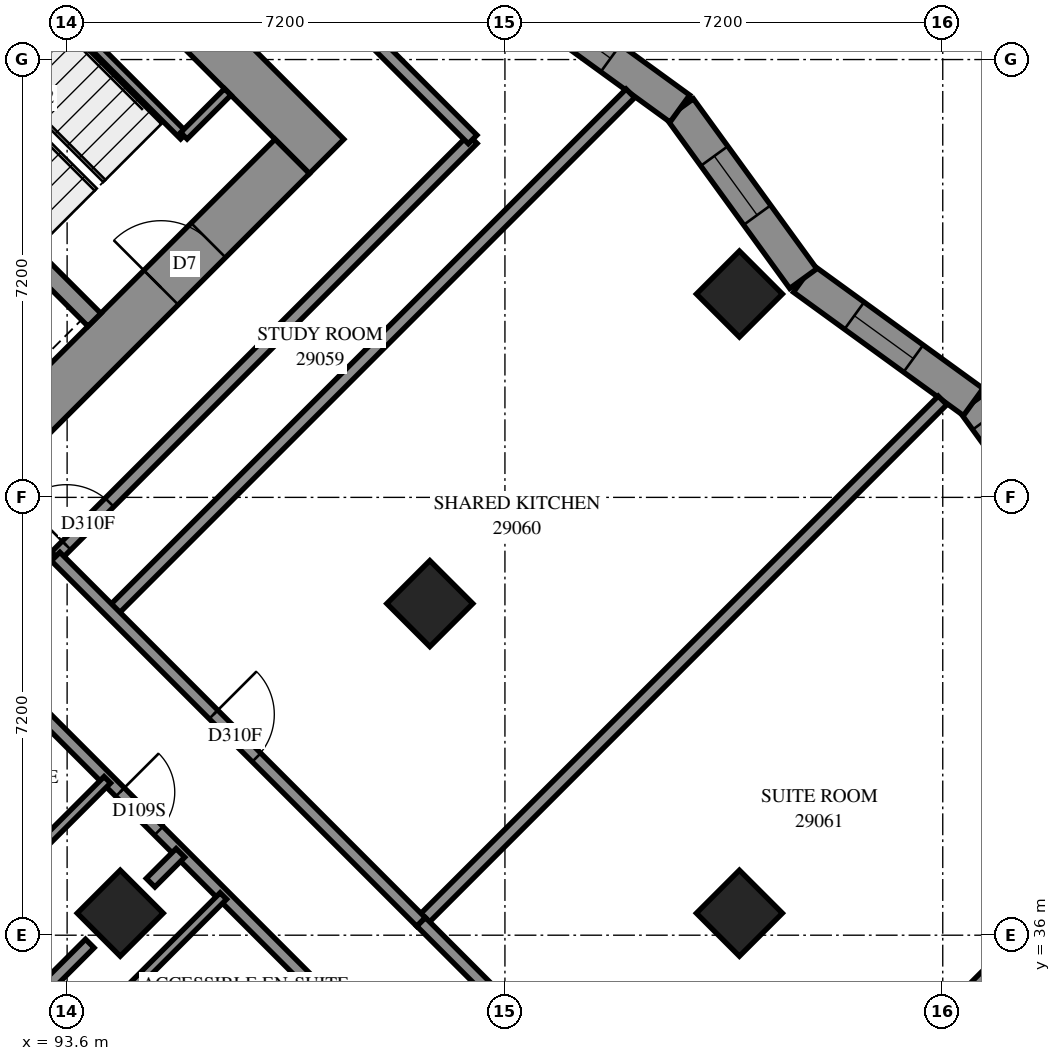
"""IFC4 building model, lengths in metres.
Left out: names, types, materials, properties, quantities, classifications, styles, units other than length and angle.
Written with IfcOpenShell. Run it as: python <this file> out.ifc"""

import sys

from ifc_helpers import new_model, si_unit, direction, frame, frame_2d, origin, origin_2d, place, context, subcontext, project, spatial, polyline, rectangle, outline, extrude, element, fill, save


model = new_model("IFC4")
c1 = context("Model", 3, precision=1e-05, world=origin(), true_north=direction((0.0, 1.0)))
c2 = subcontext(c1, "Body", "Model", "MODEL_VIEW")
j1 = project(units=[si_unit("LENGTHUNIT", "METRE"), si_unit("PLANEANGLEUNIT", "RADIAN")], contexts=[c1])
p1 = place(None, origin())
s1 = spatial("IfcSite", under=j1, at=p1, CompositionType="ELEMENT")
p2 = place(p1, origin())
s2 = spatial("IfcBuilding", under=s1, at=p2, CompositionType="ELEMENT")
p3 = place(p2, frame((0.0, 0.0, 108.4)))
s3 = spatial("IfcBuildingStorey", under=s2, at=p3, CompositionType="ELEMENT", Elevation=108.4)
for number, where, z_axis, x_axis in (
    (1, (104.656, 46.544, 0.0), (0.0, 0.0, 1.0), (0.707, -0.707, 0.0)),
    (2, (99.565, 41.453, 0.0), (0.0, 0.0, 1.0), (0.707, -0.707, 0.0)),
    (3, (94.474, 36.362, 0.0), (0.0, 0.0, 1.0), (0.707, -0.707, 0.0)),
    (4, (104.656, 36.362, 0.0), (0.0, 0.0, 1.0), (0.707, -0.707, 0.0)),
):
    element("IfcColumn", number, at=place(p3, frame(where, z_axis=z_axis, x_axis=x_axis)), inside=s3, PredefinedType="COLUMN", context=c2, shape_type="SweptSolid", body=[
        extrude(rectangle(XDim=1.0, YDim=1.0, at=origin_2d()), origin(), (0.0, 0.0, 1.0), 3.1),
    ])
p4 = place(p3, frame((86.554, 60.121, -0.3), z_axis=(0.0, 0.0, 1.0), x_axis=(0.7071067812, -0.7071067812, 0.0)))
e5 = element("IfcWall", 5, at=p4, inside=s3, PredefinedType="SHEAR", context=c2, shape_type="SweptSolid", body=[
    extrude(rectangle(XDim=16.0, YDim=0.8, at=frame_2d((8.0, 0.0))), origin(), (0.0, 0.0, 1.0), 2.7),
])
p5 = place(p4, frame((10.8, 0.0, 0.3)))
e6 = element("IfcOpeningElement", 6, at=p5, cuts=e5, PredefinedType="OPENING", context=c2, shape_type="SweptSolid", body=[
    extrude(rectangle(XDim=0.8, YDim=2.1, at=frame_2d((0.4, 1.05))), frame((0.0, 0.41, 0.0), z_axis=(0.0, -1.0, 0.0), x_axis=(1.0, 0.0, 0.0)), (0.0, 0.0, 1.0), 0.82),
])
p6 = place(p3, frame((87.12, 38.625, -0.3), z_axis=(0.0, 0.0, 1.0), x_axis=(0.7071067812, 0.7071067812, 0.0)))
e7 = element("IfcWall", 7, at=p6, inside=s3, PredefinedType="SHEAR", context=c2, shape_type="SweptSolid", body=[
    extrude(rectangle(XDim=14.4, YDim=0.8, at=frame_2d((7.2, 0.0))), origin(), (0.0, 0.0, 1.0), 2.7),
])
p7 = place(p6, frame((4.55, 0.0, 0.3)))
e8 = element("IfcOpeningElement", 8, at=p7, cuts=e7, PredefinedType="OPENING", context=c2, shape_type="SweptSolid", body=[
    extrude(rectangle(XDim=1.1, YDim=2.1, at=frame_2d((0.55, 1.05))), frame((0.0, 0.41, 0.0), z_axis=(0.0, -1.0, 0.0), x_axis=(1.0, 0.0, 0.0)), (0.0, 0.0, 1.0), 0.82),
])
p8 = place(p6, frame((11.35, 0.0, 0.3)))
e9 = element("IfcOpeningElement", 9, at=p8, cuts=e7, PredefinedType="OPENING", context=c2, shape_type="SweptSolid", body=[
    extrude(rectangle(XDim=1.1, YDim=2.1, at=frame_2d((0.55, 1.05))), frame((0.0, 0.41, 0.0), z_axis=(0.0, -1.0, 0.0), x_axis=(1.0, 0.0, 0.0)), (0.0, 0.0, 1.0), 0.82),
])
p9 = place(p3, frame((88.958, 51.211, 0.0), z_axis=(0.0, 0.0, 1.0), x_axis=(0.7070998367, -0.7071137256, 0.0)))
e10 = element("IfcWall", 10, at=p9, inside=s3, PredefinedType="SOLIDWALL", context=c2, shape_type="SweptSolid", body=[
    extrude(rectangle(XDim=7.2, YDim=0.3, at=frame_2d((3.6, 0.0))), origin(), (0.0, 0.0, 1.0), 3.1),
])
p10 = place(p3, frame((110.545, 41.953, 0.0), z_axis=(0.0, 0.0, 1.0), x_axis=(-0.5874159391, 0.8092851873, 0.0)))
e11 = element("IfcWall", 11, at=p10, inside=s3, PredefinedType="SOLIDWALL", context=c2, shape_type="SweptSolid", body=[
    extrude(outline(polyline([(0.067, -0.275), (3.522, -0.275), (3.435, 0.275), (-0.067, 0.275), (0.067, -0.275)])), origin(), (0.0, 0.0, 1.0), 3.1),
])
p11 = place(p10, frame((0.318, 0.0, 0.5)))
e12 = element("IfcOpeningElement", 12, at=p11, cuts=e11, PredefinedType="OPENING", context=c2, shape_type="SweptSolid", body=[
    extrude(rectangle(XDim=1.3, YDim=2.45, at=frame_2d((0.65, 1.225))), frame((0.0, 0.285, 0.0), z_axis=(0.0, -1.0, 0.0), x_axis=(1.0, 0.0, 0.0)), (0.0, 0.0, 1.0), 0.57),
])
p12 = place(p10, frame((1.817, 0.0, 0.5)))
e13 = element("IfcOpeningElement", 13, at=p12, cuts=e11, PredefinedType="OPENING", context=c2, shape_type="SweptSolid", body=[
    extrude(rectangle(XDim=1.3, YDim=2.45, at=frame_2d((0.65, 1.225))), frame((0.0, 0.285, 0.0), z_axis=(0.0, -1.0, 0.0), x_axis=(1.0, 0.0, 0.0)), (0.0, 0.0, 1.0), 0.57),
])
p13 = place(p3, frame((108.502, 44.768, 0.0), z_axis=(0.0, 0.0, 1.0), x_axis=(-0.8092802019, 0.5874228075, 0.0)))
e14 = element("IfcWall", 14, at=p13, inside=s3, PredefinedType="SOLIDWALL", context=c2, shape_type="SweptSolid", body=[
    extrude(outline(polyline([(-0.044, -0.275), (3.411, -0.275), (3.499, 0.275), (0.044, 0.275), (-0.044, -0.275)])), origin(), (0.0, 0.0, 1.0), 3.1),
])
p14 = place(p13, frame((1.218, 0.0, 0.5)))
e15 = element("IfcOpeningElement", 15, at=p14, cuts=e14, PredefinedType="OPENING", context=c2, shape_type="SweptSolid", body=[
    extrude(rectangle(XDim=1.2, YDim=2.45, at=frame_2d((0.6, 1.225))), frame((0.0, 0.285, 0.0), z_axis=(0.0, -1.0, 0.0), x_axis=(1.0, 0.0, 0.0)), (0.0, 0.0, 1.0), 0.57),
])
p15 = place(p3, frame((105.706, 46.797, 0.0), z_axis=(0.0, 0.0, 1.0), x_axis=(-0.5874228075, 0.8092802019, 0.0)))
e16 = element("IfcWall", 16, at=p15, inside=s3, PredefinedType="SOLIDWALL", context=c2, shape_type="SweptSolid", body=[
    extrude(outline(polyline([(0.044, -0.275), (3.499, -0.275), (3.411, 0.275), (-0.044, 0.275), (0.044, -0.275)])), origin(), (0.0, 0.0, 1.0), 3.1),
])
p16 = place(p15, frame((1.291, 0.0, 0.5)))
e17 = element("IfcOpeningElement", 17, at=p16, cuts=e16, PredefinedType="OPENING", context=c2, shape_type="SweptSolid", body=[
    extrude(rectangle(XDim=1.2, YDim=2.45, at=frame_2d((0.6, 1.225))), frame((0.0, 0.285, 0.0), z_axis=(0.0, -1.0, 0.0), x_axis=(1.0, 0.0, 0.0)), (0.0, 0.0, 1.0), 0.57),
])
p17 = place(p3, frame((103.677, 49.593, 0.0), z_axis=(0.0, 0.0, 1.0), x_axis=(-0.8092802019, 0.5874228075, 0.0)))
e18 = element("IfcWall", 18, at=p17, inside=s3, PredefinedType="SOLIDWALL", context=c2, shape_type="SweptSolid", body=[
    extrude(outline(polyline([(-0.044, -0.275), (3.411, -0.275), (3.499, 0.275), (0.044, 0.275), (-0.044, -0.275)])), origin(), (0.0, 0.0, 1.0), 3.1),
])
p18 = place(p17, frame((1.408, 0.0, 0.5)))
e19 = element("IfcOpeningElement", 19, at=p18, cuts=e18, PredefinedType="OPENING", context=c2, shape_type="SweptSolid", body=[
    extrude(rectangle(XDim=1.2, YDim=2.45, at=frame_2d((0.6, 1.225))), frame((0.0, 0.285, 0.0), z_axis=(0.0, -1.0, 0.0), x_axis=(1.0, 0.0, 0.0)), (0.0, 0.0, 1.0), 0.57),
])
p19 = place(p3, frame((91.313, 53.354, 0.0), z_axis=(0.0, 0.0, 1.0), x_axis=(0.7071067812, -0.7071067812, 0.0)))
e20 = element("IfcWall", 20, at=p19, inside=s3, PredefinedType="PARTITIONING", context=c2, shape_type="SweptSolid", body=[
    extrude(rectangle(XDim=5.95, YDim=0.15, at=frame_2d((2.975, 0.0))), origin(), (0.0, 0.0, 1.0), 3.1),
])
p20 = place(p3, frame((95.52, 49.146, 0.0), z_axis=(0.0, 0.0, 1.0), x_axis=(0.7071067812, 0.7071067812, 0.0)))
e21 = element("IfcWall", 21, at=p20, inside=s3, PredefinedType="PARTITIONING", context=c2, shape_type="SweptSolid", body=[
    extrude(rectangle(XDim=1.02, YDim=0.15, at=frame_2d((0.51, 0.0))), origin(), (0.0, 0.0, 1.0), 3.1),
])
p21 = place(p3, frame((92.004, 40.819, 0.0), z_axis=(0.0, 0.0, 1.0), x_axis=(0.7071067812, -0.7071067812, 0.0)))
e22 = element("IfcWall", 22, at=p21, inside=s3, PredefinedType="PARTITIONING", context=c2, shape_type="SweptSolid", body=[
    extrude(rectangle(XDim=19.298, YDim=0.2, at=frame_2d((9.649, 0.0))), origin(), (0.0, 0.0, 1.0), 3.1),
])
p22 = place(p21, frame((3.489, 0.0, 0.0)))
e23 = element("IfcOpeningElement", 23, at=p22, cuts=e22, PredefinedType="OPENING", context=c2, shape_type="SweptSolid", body=[
    extrude(rectangle(XDim=0.9, YDim=2.1, at=frame_2d((0.45, 1.05))), frame((0.0, 0.11, 0.0), z_axis=(0.0, -1.0, 0.0), x_axis=(1.0, 0.0, 0.0)), (0.0, 0.0, 1.0), 0.22),
])
p23 = place(p21, frame((9.319, 0.0, 0.0)))
e24 = element("IfcOpeningElement", 24, at=p23, cuts=e22, PredefinedType="OPENING", context=c2, shape_type="SweptSolid", body=[
    extrude(rectangle(XDim=0.9, YDim=2.1, at=frame_2d((0.45, 1.05))), frame((0.0, 0.11, 0.0), z_axis=(0.0, -1.0, 0.0), x_axis=(1.0, 0.0, 0.0)), (0.0, 0.0, 1.0), 0.22),
])
p24 = place(p21, frame((15.961, 0.0, 0.0)))
e25 = element("IfcOpeningElement", 25, at=p24, cuts=e22, PredefinedType="OPENING", context=c2, shape_type="SweptSolid", body=[
    extrude(rectangle(XDim=0.9, YDim=2.1, at=frame_2d((0.45, 1.05))), frame((0.0, 0.11, 0.0), z_axis=(0.0, -1.0, 0.0), x_axis=(1.0, 0.0, 0.0)), (0.0, 0.0, 1.0), 0.22),
])
p25 = place(p3, frame((99.423, 36.221, 0.0), z_axis=(0.0, 0.0, 1.0), x_axis=(0.7071067812, 0.7071067812, 0.0)))
e26 = element("IfcWall", 26, at=p25, inside=s3, PredefinedType="PARTITIONING", context=c2, shape_type="SweptSolid", body=[
    extrude(rectangle(XDim=12.125, YDim=0.2, at=frame_2d((6.062, 0.0))), origin(), (0.0, 0.0, 1.0), 3.1),
])
p26 = place(p3, frame((94.331, 41.313, 0.0), z_axis=(0.0, 0.0, 1.0), x_axis=(0.7071109253, 0.7071026371, 0.0)))
e27 = element("IfcWall", 27, at=p26, inside=s3, PredefinedType="PARTITIONING", context=c2, shape_type="SweptSolid", body=[
    extrude(rectangle(XDim=12.065, YDim=0.2, at=frame_2d((6.033, 0.0))), origin(), (0.0, 0.0, 1.0), 3.1),
])
p27 = place(p3, frame((93.413, 42.233, 0.0), z_axis=(0.0, 0.0, 1.0), x_axis=(0.7071067812, 0.7071067812, 0.0)))
e28 = element("IfcWall", 28, at=p27, inside=s3, PredefinedType="PARTITIONING", context=c2, shape_type="SweptSolid", body=[
    extrude(rectangle(XDim=9.699, YDim=0.2, at=frame_2d((4.849, 0.0))), origin(), (0.0, 0.0, 1.0), 3.1),
])
p28 = place(p27, frame((0.249, 0.0, 0.0)))
e29 = element("IfcOpeningElement", 29, at=p28, cuts=e28, PredefinedType="OPENING", context=c2, shape_type="SweptSolid", body=[
    extrude(rectangle(XDim=1.0, YDim=2.1, at=frame_2d((0.5, 1.05))), frame((0.0, 0.11, 0.0), z_axis=(0.0, -1.0, 0.0), x_axis=(1.0, 0.0, 0.0)), (0.0, 0.0, 1.0), 0.22),
])
p29 = place(p3, frame((93.411, 42.227, 0.0), z_axis=(0.0, 0.0, 1.0), x_axis=(0.7071067812, -0.7071067812, 0.0)))
e30 = element("IfcWall", 30, at=p29, inside=s3, PredefinedType="PARTITIONING", context=c2, shape_type="SweptSolid", body=[
    extrude(rectangle(XDim=8.499, YDim=0.2, at=frame_2d((4.25, 0.0))), origin(), (0.0, 0.0, 1.0), 3.1),
])
p30 = place(p29, frame((3.672, 0.0, 0.0)))
e31 = element("IfcOpeningElement", 31, at=p30, cuts=e30, PredefinedType="OPENING", context=c2, shape_type="SweptSolid", body=[
    extrude(rectangle(XDim=1.0, YDim=2.1, at=frame_2d((0.5, 1.05))), frame((0.0, 0.11, 0.0), z_axis=(0.0, -1.0, 0.0), x_axis=(1.0, 0.0, 0.0)), (0.0, 0.0, 1.0), 0.22),
])
p31 = place(p3, frame((96.097, 53.258, 0.0), z_axis=(0.0, 0.0, 1.0), x_axis=(0.7071067812, -0.7071067812, 0.0)))
e32 = element("IfcWall", 32, at=p31, inside=s3, PredefinedType="PARTITIONING", context=c2, shape_type="SweptSolid", body=[
    extrude(rectangle(XDim=5.9, YDim=0.2, at=frame_2d((2.95, 0.0))), origin(), (0.0, 0.0, 1.0), 3.1),
])
p32 = place(p31, frame((2.006, 0.0, 0.0)))
e33 = element("IfcOpeningElement", 33, at=p32, cuts=e32, PredefinedType="OPENING", context=c2, shape_type="SweptSolid", body=[
    extrude(rectangle(XDim=0.9, YDim=2.1, at=frame_2d((0.45, 1.05))), frame((0.0, 0.11, 0.0), z_axis=(0.0, -1.0, 0.0), x_axis=(1.0, 0.0, 0.0)), (0.0, 0.0, 1.0), 0.22),
])
p33 = place(p3, frame((89.881, 31.771, 0.0), z_axis=(0.0, 0.0, 1.0), x_axis=(0.7071067812, 0.7071067812, 0.0)))
e34 = element("IfcWall", 34, at=p33, inside=s3, PredefinedType="PARTITIONING", context=c2, shape_type="SweptSolid", body=[
    extrude(rectangle(XDim=5.787, YDim=0.2, at=frame_2d((2.893, 0.0))), origin(), (0.0, 0.0, 1.0), 3.1),
])
p34 = place(p3, frame((103.168, 32.47, 0.0), z_axis=(0.0, 0.0, 1.0), x_axis=(-0.7067858967, 0.7074275201, 0.0)))
e35 = element("IfcWall", 35, at=p34, inside=s3, PredefinedType="PARTITIONING", context=c2, shape_type="SweptSolid", body=[
    extrude(rectangle(XDim=5.299, YDim=0.2, at=frame_2d((2.65, 0.0))), origin(), (0.0, 0.0, 1.0), 3.1),
])
p35 = place(p34, frame((2.043, 0.0, 0.0)))
e36 = element("IfcOpeningElement", 36, at=p35, cuts=e35, PredefinedType="OPENING", context=c2, shape_type="SweptSolid", body=[
    extrude(rectangle(XDim=0.9, YDim=2.1, at=frame_2d((0.45, 1.05))), frame((0.0, 0.11, 0.0), z_axis=(0.0, -1.0, 0.0), x_axis=(1.0, 0.0, 0.0)), (0.0, 0.0, 1.0), 0.22),
])
p36 = place(p3, frame((106.211, 32.827, 0.0), z_axis=(0.0, 0.0, 1.0), x_axis=(0.7071067812, 0.7071067812, 0.0)))
e37 = element("IfcWall", 37, at=p36, inside=s3, PredefinedType="PARTITIONING", context=c2, shape_type="SweptSolid", body=[
    extrude(rectangle(XDim=4.45, YDim=0.2, at=frame_2d((2.225, 0.0))), origin(), (0.0, 0.0, 1.0), 3.1),
])
p37 = place(p3, frame((92.563, 36.857, 0.0), z_axis=(0.0, 0.0, 1.0), x_axis=(0.7071067812, 0.7071067812, 0.0)))
e38 = element("IfcWall", 38, at=p37, inside=s3, PredefinedType="PARTITIONING", context=c2, shape_type="SweptSolid", body=[
    extrude(rectangle(XDim=2.401, YDim=0.15, at=frame_2d((1.201, 0.0))), origin(), (0.0, 0.0, 1.0), 3.1),
])
p38 = place(p3, frame((94.473, 34.949, 0.0), z_axis=(0.0, 0.0, 1.0), x_axis=(0.7071067812, 0.7071067812, 0.0)))
e39 = element("IfcWall", 39, at=p38, inside=s3, PredefinedType="PARTITIONING", context=c2, shape_type="SweptSolid", body=[
    extrude(rectangle(XDim=2.398, YDim=0.15, at=frame_2d((1.199, 0.0))), origin(), (0.0, 0.0, 1.0), 3.1),
])
p39 = place(p3, frame((94.973, 36.863, 0.0), z_axis=(0.0, 0.0, 1.0), x_axis=(0.7071067812, 0.7071067812, 0.0)))
e40 = element("IfcWall", 40, at=p39, inside=s3, PredefinedType="PARTITIONING", context=c2, shape_type="SweptSolid", body=[
    extrude(rectangle(XDim=0.693, YDim=0.2, at=frame_2d((0.346, 0.0))), origin(), (0.0, 0.0, 1.0), 3.1),
])
p40 = place(p12, origin())
e41 = element("IfcWindow", 41, at=p40, inside=s3, PartitioningType="SINGLE_PANEL", PredefinedType="WINDOW", context=c2, shape_type="SweptSolid", body=[
    extrude(rectangle(XDim=1.3, YDim=2.45, at=frame_2d((0.65, 1.225))), frame((0.0, 0.155, 0.0), z_axis=(0.0, -1.0, 0.0), x_axis=(1.0, 0.0, 0.0)), (0.0, 0.0, 1.0), 0.06),
])
fill(e13, e41)
p41 = place(p14, origin())
e42 = element("IfcWindow", 42, at=p41, inside=s3, PartitioningType="SINGLE_PANEL", PredefinedType="WINDOW", context=c2, shape_type="SweptSolid", body=[
    extrude(rectangle(XDim=1.2, YDim=2.45, at=frame_2d((0.6, 1.225))), frame((0.0, 0.155, 0.0), z_axis=(0.0, -1.0, 0.0), x_axis=(1.0, 0.0, 0.0)), (0.0, 0.0, 1.0), 0.06),
])
fill(e15, e42)
p42 = place(p16, origin())
e43 = element("IfcWindow", 43, at=p42, inside=s3, PartitioningType="SINGLE_PANEL", PredefinedType="WINDOW", context=c2, shape_type="SweptSolid", body=[
    extrude(rectangle(XDim=1.2, YDim=2.45, at=frame_2d((0.6, 1.225))), frame((0.0, 0.155, 0.0), z_axis=(0.0, -1.0, 0.0), x_axis=(1.0, 0.0, 0.0)), (0.0, 0.0, 1.0), 0.06),
])
fill(e17, e43)
p43 = place(p18, origin())
e44 = element("IfcWindow", 44, at=p43, inside=s3, PartitioningType="SINGLE_PANEL", PredefinedType="WINDOW", context=c2, shape_type="SweptSolid", body=[
    extrude(rectangle(XDim=1.2, YDim=2.45, at=frame_2d((0.6, 1.225))), frame((0.0, 0.155, 0.0), z_axis=(0.0, -1.0, 0.0), x_axis=(1.0, 0.0, 0.0)), (0.0, 0.0, 1.0), 0.06),
])
fill(e19, e44)
p44 = place(p8, origin())
e45 = element("IfcDoor", 45, at=p44, inside=s3, OperationType="SINGLE_SWING_RIGHT", PredefinedType="DOOR", context=c2, shape_type="SweptSolid", body=[
    extrude(rectangle(XDim=1.1, YDim=2.1, at=frame_2d((0.55, 1.05))), frame((0.0, 0.025, 0.0), z_axis=(0.0, -1.0, 0.0), x_axis=(1.0, 0.0, 0.0)), (0.0, 0.0, 1.0), 0.05),
])
fill(e9, e45)
p45 = place(p28, origin())
e46 = element("IfcDoor", 46, at=p45, inside=s3, OperationType="SINGLE_SWING_LEFT", PredefinedType="DOOR", context=c2, shape_type="SweptSolid", body=[
    extrude(rectangle(XDim=1.0, YDim=2.1, at=frame_2d((0.5, 1.05))), frame((0.0, 0.025, 0.0), z_axis=(0.0, -1.0, 0.0), x_axis=(1.0, 0.0, 0.0)), (0.0, 0.0, 1.0), 0.05),
])
fill(e29, e46)
p46 = place(p30, origin())
e47 = element("IfcDoor", 47, at=p46, inside=s3, OperationType="SINGLE_SWING_RIGHT", PredefinedType="DOOR", context=c2, shape_type="SweptSolid", body=[
    extrude(rectangle(XDim=1.0, YDim=2.1, at=frame_2d((0.5, 1.05))), frame((0.0, 0.025, 0.0), z_axis=(0.0, -1.0, 0.0), x_axis=(1.0, 0.0, 0.0)), (0.0, 0.0, 1.0), 0.05),
])
fill(e31, e47)
p47 = place(p22, origin())
e48 = element("IfcDoor", 48, at=p47, inside=s3, OperationType="SINGLE_SWING_LEFT", PredefinedType="DOOR", context=c2, shape_type="SweptSolid", body=[
    extrude(rectangle(XDim=0.9, YDim=2.1, at=frame_2d((0.45, 1.05))), frame((0.0, 0.025, 0.0), z_axis=(0.0, -1.0, 0.0), x_axis=(1.0, 0.0, 0.0)), (0.0, 0.0, 1.0), 0.05),
])
fill(e23, e48)
save(model, sys.argv[1])
